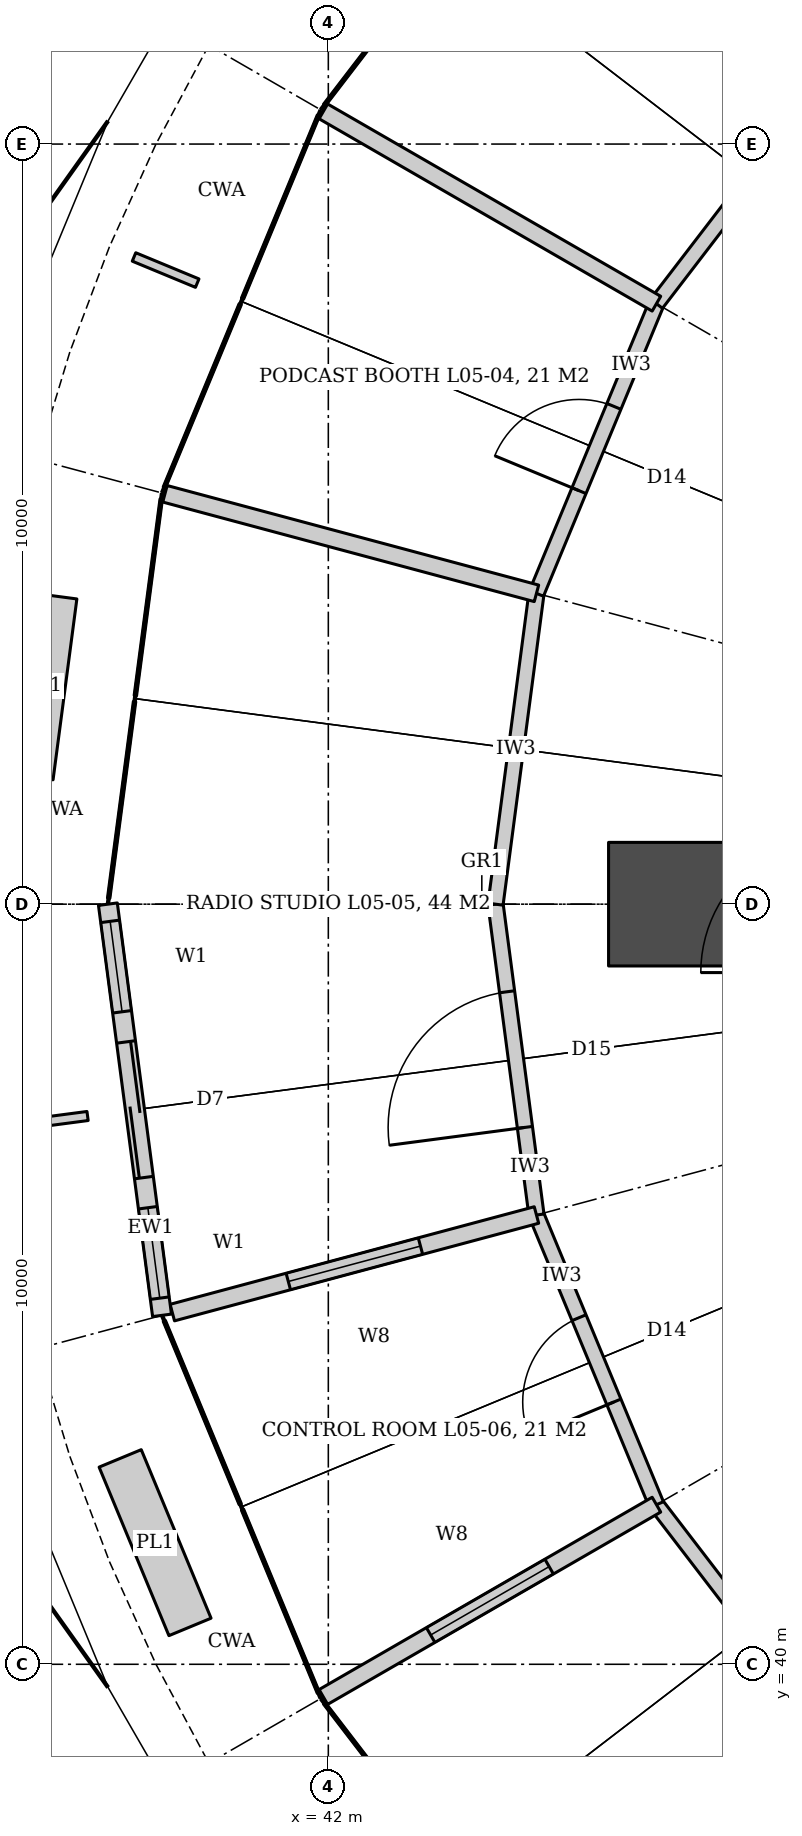
"""IFC4 building model, lengths in metres.
Left out: names, types, materials, properties, quantities, classifications, styles, units other than length and angle.
Written with IfcOpenShell. Run it as: python <this file> out.ifc"""

import sys

from ifc_helpers import new_model, si_unit, direction, frame, frame_2d, origin, origin_2d, place, context, subcontext, project, spatial, rectangle, hollow_circle, extrude, element, fill, save


model = new_model("IFC4")
c1 = context("Model", 3, precision=1e-05, world=origin(), true_north=direction((0.0, 1.0)))
c2 = subcontext(c1, "Body", "Model", "MODEL_VIEW")
j1 = project(units=[si_unit("LENGTHUNIT", "METRE"), si_unit("PLANEANGLEUNIT", "RADIAN")], contexts=[c1])
p1 = place(None, origin())
s1 = spatial("IfcSite", under=j1, at=p1, CompositionType="ELEMENT")
p2 = place(p1, origin())
s2 = spatial("IfcBuilding", under=s1, at=p2, CompositionType="ELEMENT")
p3 = place(p2, frame((0.0, 0.0, 30.2)))
s3 = spatial("IfcBuildingStorey", under=s2, at=p3, CompositionType="ELEMENT", Elevation=30.2)
p4 = place(p3, frame((46.5, 50.0, 0.0), z_axis=(0.0, 0.0, 1.0), x_axis=(1.0, 0.0, 0.0)))
e1 = element("IfcColumn", 1, at=p4, inside=s3, PredefinedType="COLUMN", context=c2, shape_type="SweptSolid", body=[
    extrude(hollow_circle(Radius=0.813, WallThickness=0.08, at=origin_2d()), origin(), (0.0, 0.0, 1.0), 4.2),
])
p5 = place(p3, frame((48.828, 38.828, 0.0), z_axis=(0.0, 0.0, 1.0), x_axis=(-0.608714823874, 0.793389099494, 0.0)))
e2 = element("IfcWall", 2, at=p5, inside=s3, PredefinedType="PARTITIONING", context=c2, shape_type="SweptSolid", body=[
    extrude(rectangle(XDim=4.125, YDim=0.2, at=frame_2d((2.062, 0.0))), origin(), (0.0, 0.0, 1.0), 3.04),
])
p6 = place(p3, frame((46.317, 42.1, 0.0), z_axis=(0.0, 0.0, 1.0), x_axis=(-0.382731667114, 0.923859551549, 0.0)))
e3 = element("IfcWall", 3, at=p6, inside=s3, PredefinedType="PARTITIONING", context=c2, shape_type="SweptSolid", body=[
    extrude(rectangle(XDim=4.125, YDim=0.2, at=frame_2d((2.062, 0.0))), origin(), (0.0, 0.0, 1.0), 3.04),
])
p7 = place(p6, frame((1.462, 0.0, 0.0)))
e4 = element("IfcOpeningElement", 4, at=p7, cuts=e3, PredefinedType="OPENING", context=c2, shape_type="SweptSolid", body=[
    extrude(rectangle(XDim=1.2, YDim=2.4, at=frame_2d((0.6, 1.2))), frame((0.0, 0.11, 0.0), z_axis=(0.0, -1.0, 0.0), x_axis=(1.0, 0.0, 0.0)), (0.0, 0.0, 1.0), 0.22),
])
p8 = place(p3, frame((44.738, 45.911, 0.0), z_axis=(0.0, 0.0, 1.0), x_axis=(-0.130515758099, 0.991446234996, 0.0)))
e5 = element("IfcWall", 5, at=p8, inside=s3, PredefinedType="PARTITIONING", context=c2, shape_type="SweptSolid", body=[
    extrude(rectangle(XDim=4.125, YDim=0.2, at=frame_2d((2.062, 0.0))), origin(), (0.0, 0.0, 1.0), 3.04),
])
p9 = place(p8, frame((1.162, 0.0, 0.0)))
e6 = element("IfcOpeningElement", 6, at=p9, cuts=e5, PredefinedType="OPENING", context=c2, shape_type="SweptSolid", body=[
    extrude(rectangle(XDim=1.8, YDim=2.7, at=frame_2d((0.9, 1.35))), frame((0.0, 0.11, 0.0), z_axis=(0.0, -1.0, 0.0), x_axis=(1.0, 0.0, 0.0)), (0.0, 0.0, 1.0), 0.22),
])
p10 = place(p3, frame((44.2, 50.0, 0.0), z_axis=(0.0, 0.0, 1.0), x_axis=(0.130515758099, 0.991446234996, 0.0)))
e7 = element("IfcWall", 7, at=p10, inside=s3, PredefinedType="PARTITIONING", context=c2, shape_type="SweptSolid", body=[
    extrude(rectangle(XDim=4.125, YDim=0.2, at=frame_2d((2.062, 0.0))), origin(), (0.0, 0.0, 1.0), 3.04),
])
p11 = place(p3, frame((44.738, 54.089, 0.0), z_axis=(0.0, 0.0, 1.0), x_axis=(0.382731667114, 0.923859551549, 0.0)))
e8 = element("IfcWall", 8, at=p11, inside=s3, PredefinedType="PARTITIONING", context=c2, shape_type="SweptSolid", body=[
    extrude(rectangle(XDim=4.125, YDim=0.2, at=frame_2d((2.062, 0.0))), origin(), (0.0, 0.0, 1.0), 3.04),
])
p12 = place(p11, frame((1.462, 0.0, 0.0)))
e9 = element("IfcOpeningElement", 9, at=p12, cuts=e8, PredefinedType="OPENING", context=c2, shape_type="SweptSolid", body=[
    extrude(rectangle(XDim=1.2, YDim=2.4, at=frame_2d((0.6, 1.2))), frame((0.0, 0.11, 0.0), z_axis=(0.0, -1.0, 0.0), x_axis=(1.0, 0.0, 0.0)), (0.0, 0.0, 1.0), 0.22),
])
p13 = place(p3, frame((46.317, 57.9, 0.0), z_axis=(0.0, 0.0, 1.0), x_axis=(0.608714823874, 0.793389099494, 0.0)))
e10 = element("IfcWall", 10, at=p13, inside=s3, PredefinedType="PARTITIONING", context=c2, shape_type="SweptSolid", body=[
    extrude(rectangle(XDim=4.125, YDim=0.2, at=frame_2d((2.062, 0.0))), origin(), (0.0, 0.0, 1.0), 3.04),
])
p14 = place(p3, frame((46.317, 57.9, 0.0), z_axis=(0.0, 0.0, 1.0), x_axis=(-0.866022478443, 0.500005066806, 0.0)))
e11 = element("IfcWall", 11, at=p14, inside=s3, PredefinedType="PARTITIONING", context=c2, shape_type="SweptSolid", body=[
    extrude(rectangle(XDim=5.06, YDim=0.225, at=frame_2d((2.53, 0.0))), origin(), (0.0, 0.0, 1.0), 3.04),
])
p15 = place(p3, frame((44.738, 54.089, 0.0), z_axis=(0.0, 0.0, 1.0), x_axis=(-0.965926729572, 0.258815673981, 0.0)))
e12 = element("IfcWall", 12, at=p15, inside=s3, PredefinedType="PARTITIONING", context=c2, shape_type="SweptSolid", body=[
    extrude(rectangle(XDim=5.06, YDim=0.225, at=frame_2d((2.53, 0.0))), origin(), (0.0, 0.0, 1.0), 3.04),
])
p16 = place(p3, frame((44.738, 45.911, 0.0), z_axis=(0.0, 0.0, 1.0), x_axis=(-0.965925420227, -0.258820560544, 0.0)))
e13 = element("IfcWall", 13, at=p16, inside=s3, PredefinedType="PARTITIONING", context=c2, shape_type="SweptSolid", body=[
    extrude(rectangle(XDim=4.96, YDim=0.225, at=frame_2d((2.48, 0.0))), origin(), (0.0, 0.0, 1.0), 3.04),
])
p17 = place(p16, frame((1.58, 0.0, 0.9)))
e14 = element("IfcOpeningElement", 14, at=p17, cuts=e13, PredefinedType="OPENING", context=c2, shape_type="SweptSolid", body=[
    extrude(rectangle(XDim=1.8, YDim=1.2, at=frame_2d((0.9, 0.6))), frame((0.0, 0.123, 0.0), z_axis=(0.0, -1.0, 0.0), x_axis=(1.0, 0.0, 0.0)), (0.0, 0.0, 1.0), 0.245),
])
p18 = place(p3, frame((46.317, 42.1, 0.0), z_axis=(0.0, 0.0, 1.0), x_axis=(-0.866022478443, -0.500005066806, 0.0)))
e15 = element("IfcWall", 15, at=p18, inside=s3, PredefinedType="PARTITIONING", context=c2, shape_type="SweptSolid", body=[
    extrude(rectangle(XDim=5.06, YDim=0.225, at=frame_2d((2.53, 0.0))), origin(), (0.0, 0.0, 1.0), 3.04),
])
p19 = place(p18, frame((1.63, 0.0, 0.9)))
e16 = element("IfcOpeningElement", 16, at=p19, cuts=e15, PredefinedType="OPENING", context=c2, shape_type="SweptSolid", body=[
    extrude(rectangle(XDim=1.8, YDim=1.2, at=frame_2d((0.9, 0.6))), frame((0.0, 0.123, 0.0), z_axis=(0.0, -1.0, 0.0), x_axis=(1.0, 0.0, 0.0)), (0.0, 0.0, 1.0), 0.245),
])
p20 = place(p3, frame((39.1, 50.0, 0.0), z_axis=(0.0, 0.0, 1.0), x_axis=(0.130525119492, -0.991445002601, 0.0)))
e17 = element("IfcWall", 17, at=p20, inside=s3, PredefinedType="SOLIDWALL", context=c2, shape_type="SweptSolid", body=[
    extrude(rectangle(XDim=5.456, YDim=0.25, at=frame_2d((2.728, 0.0))), origin(), (0.0, 0.0, 1.0), 4.04),
])
p21 = place(p20, frame((1.828, 0.0, 0.0)))
e18 = element("IfcOpeningElement", 18, at=p21, cuts=e17, PredefinedType="OPENING", context=c2, shape_type="SweptSolid", body=[
    extrude(rectangle(XDim=1.8, YDim=2.4, at=frame_2d((0.9, 1.2))), frame((0.0, 0.135, 0.0), z_axis=(0.0, -1.0, 0.0), x_axis=(1.0, 0.0, 0.0)), (0.0, 0.0, 1.0), 0.27),
])
p22 = place(p20, frame((0.228, 0.0, 0.0)))
e19 = element("IfcOpeningElement", 19, at=p22, cuts=e17, PredefinedType="OPENING", context=c2, shape_type="SweptSolid", body=[
    extrude(rectangle(XDim=1.2, YDim=2.4, at=frame_2d((0.6, 1.2))), frame((0.0, 0.135, 0.0), z_axis=(0.0, -1.0, 0.0), x_axis=(1.0, 0.0, 0.0)), (0.0, 0.0, 1.0), 0.27),
])
p23 = place(p20, frame((4.028, 0.0, 0.0)))
e20 = element("IfcOpeningElement", 20, at=p23, cuts=e17, PredefinedType="OPENING", context=c2, shape_type="SweptSolid", body=[
    extrude(rectangle(XDim=1.2, YDim=2.4, at=frame_2d((0.6, 1.2))), frame((0.0, 0.135, 0.0), z_axis=(0.0, -1.0, 0.0), x_axis=(1.0, 0.0, 0.0)), (0.0, 0.0, 1.0), 0.27),
])
p24 = place(p17, origin())
e21 = element("IfcWindow", 21, at=p24, inside=s3, PartitioningType="SINGLE_PANEL", PredefinedType="WINDOW", context=c2, shape_type="SweptSolid", body=[
    extrude(rectangle(XDim=1.8, YDim=1.2, at=frame_2d((0.9, 0.6))), frame((0.0, 0.03, 0.0), z_axis=(0.0, -1.0, 0.0), x_axis=(1.0, 0.0, 0.0)), (0.0, 0.0, 1.0), 0.06),
])
fill(e14, e21)
p25 = place(p19, origin())
e22 = element("IfcWindow", 22, at=p25, inside=s3, PartitioningType="SINGLE_PANEL", PredefinedType="WINDOW", context=c2, shape_type="SweptSolid", body=[
    extrude(rectangle(XDim=1.8, YDim=1.2, at=frame_2d((0.9, 0.6))), frame((0.0, 0.03, 0.0), z_axis=(0.0, -1.0, 0.0), x_axis=(1.0, 0.0, 0.0)), (0.0, 0.0, 1.0), 0.06),
])
fill(e16, e22)
p26 = place(p12, origin())
e23 = element("IfcDoor", 23, at=p26, inside=s3, OperationType="SINGLE_SWING_LEFT", PredefinedType="DOOR", context=c2, shape_type="SweptSolid", body=[
    extrude(rectangle(XDim=1.2, YDim=2.4, at=frame_2d((0.6, 1.2))), frame((0.0, 0.025, 0.0), z_axis=(0.0, -1.0, 0.0), x_axis=(1.0, 0.0, 0.0)), (0.0, 0.0, 1.0), 0.05),
])
fill(e9, e23)
p27 = place(p9, origin())
e24 = element("IfcDoor", 24, at=p27, inside=s3, OperationType="DOUBLE_DOOR_DOUBLE_SWING", PredefinedType="DOOR", context=c2, shape_type="SweptSolid", body=[
    extrude(rectangle(XDim=1.8, YDim=2.7, at=frame_2d((0.9, 1.35))), frame((0.0, 0.025, 0.0), z_axis=(0.0, -1.0, 0.0), x_axis=(1.0, 0.0, 0.0)), (0.0, 0.0, 1.0), 0.05),
])
fill(e6, e24)
p28 = place(p7, origin())
e25 = element("IfcDoor", 25, at=p28, inside=s3, OperationType="SINGLE_SWING_LEFT", PredefinedType="DOOR", context=c2, shape_type="SweptSolid", body=[
    extrude(rectangle(XDim=1.2, YDim=2.4, at=frame_2d((0.6, 1.2))), frame((0.0, 0.025, 0.0), z_axis=(0.0, -1.0, 0.0), x_axis=(1.0, 0.0, 0.0)), (0.0, 0.0, 1.0), 0.05),
])
fill(e4, e25)
p29 = place(p21, origin())
e26 = element("IfcDoor", 26, at=p29, inside=s3, OperationType="DOUBLE_DOOR_SLIDING", PredefinedType="DOOR", context=c2, shape_type="SweptSolid", body=[
    extrude(rectangle(XDim=1.8, YDim=2.4, at=frame_2d((0.9, 1.2))), frame((0.0, 0.025, 0.0), z_axis=(0.0, -1.0, 0.0), x_axis=(1.0, 0.0, 0.0)), (0.0, 0.0, 1.0), 0.05),
])
fill(e18, e26)
p30 = place(p22, origin())
e27 = element("IfcWindow", 27, at=p30, inside=s3, PartitioningType="SINGLE_PANEL", PredefinedType="WINDOW", context=c2, shape_type="SweptSolid", body=[
    extrude(rectangle(XDim=1.2, YDim=2.4, at=frame_2d((0.6, 1.2))), frame((0.0, 0.03, 0.0), z_axis=(0.0, -1.0, 0.0), x_axis=(1.0, 0.0, 0.0)), (0.0, 0.0, 1.0), 0.06),
])
fill(e19, e27)
p31 = place(p23, origin())
e28 = element("IfcWindow", 28, at=p31, inside=s3, PartitioningType="SINGLE_PANEL", PredefinedType="WINDOW", context=c2, shape_type="SweptSolid", body=[
    extrude(rectangle(XDim=1.2, YDim=2.4, at=frame_2d((0.6, 1.2))), frame((0.0, 0.03, 0.0), z_axis=(0.0, -1.0, 0.0), x_axis=(1.0, 0.0, 0.0)), (0.0, 0.0, 1.0), 0.06),
])
fill(e20, e28)
save(model, sys.argv[1])
